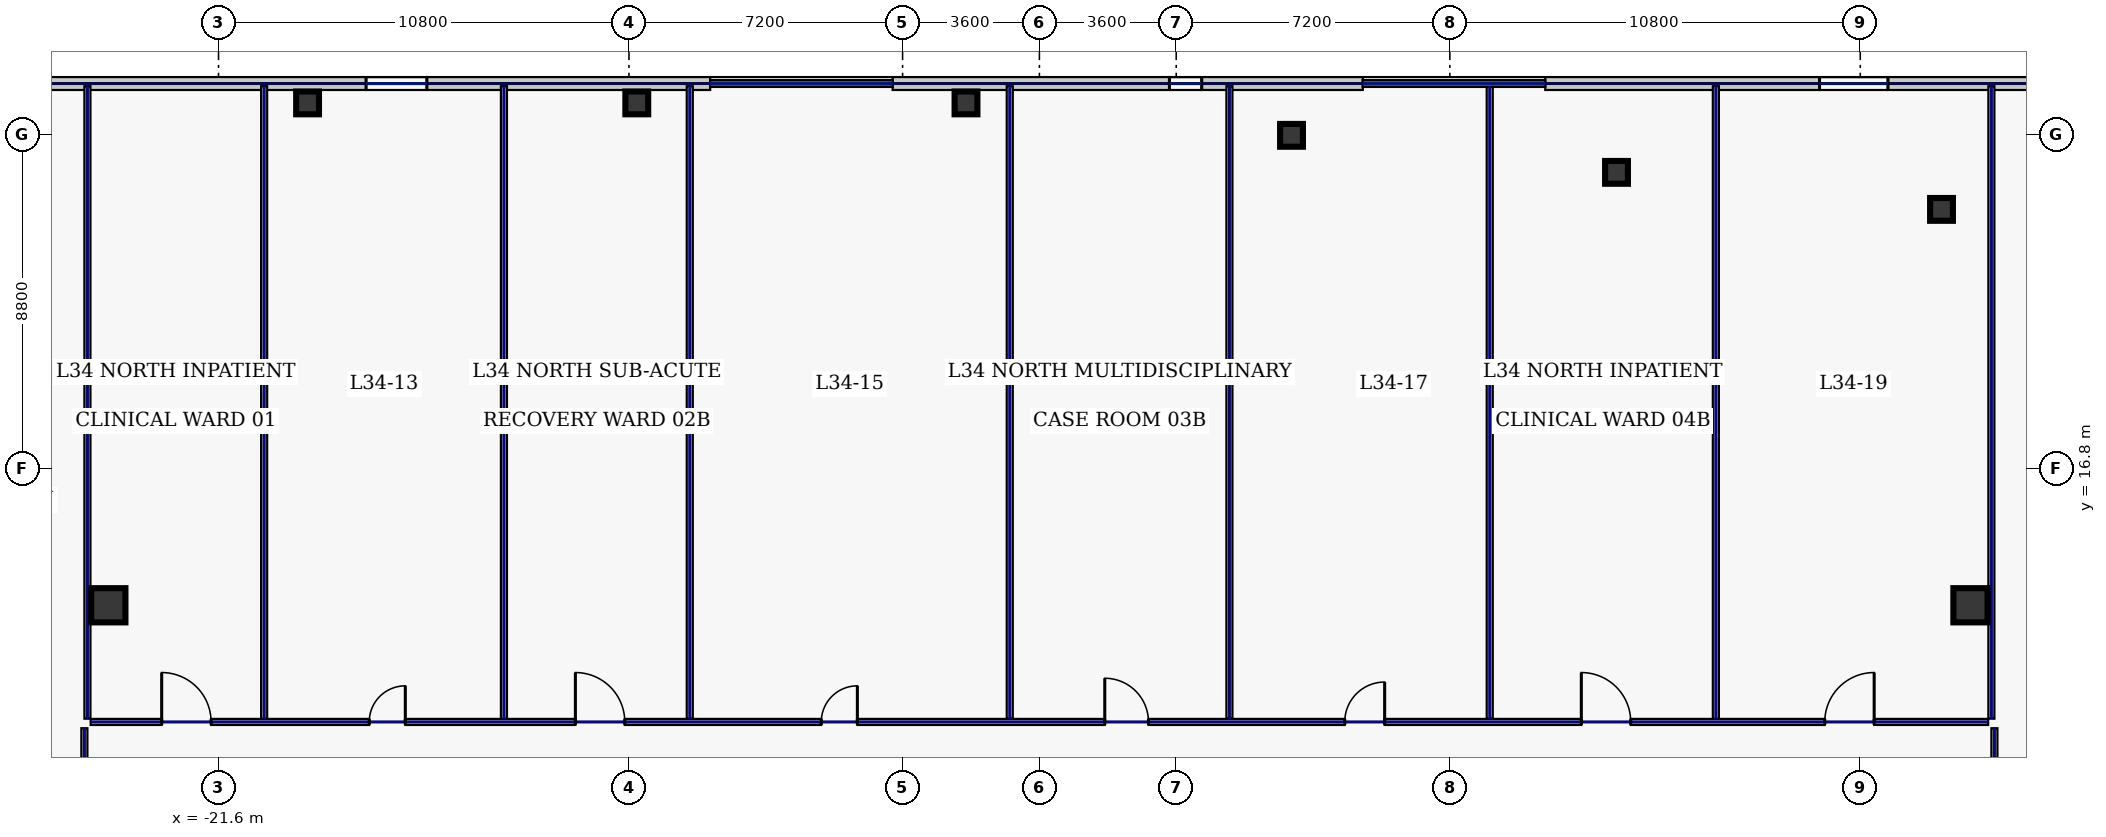
"""IFC4 building model, lengths in metres.
Left out: names, types, materials, properties, quantities, classifications, styles, units other than length and angle.
Written with IfcOpenShell. Run it as: python <this file> out.ifc"""

import sys

from ifc_helpers import new_model, si_unit, direction, frame, frame_2d, origin, origin_2d, place, context, subcontext, project, spatial, rectangle, hollow_rectangle, extrude, element, fill, save


model = new_model("IFC4")
c1 = context("Model", 3, precision=1e-05, world=origin(), true_north=direction((0.0, 1.0)))
c2 = subcontext(c1, "Body", "Model", "MODEL_VIEW")
j1 = project(units=[si_unit("LENGTHUNIT", "METRE"), si_unit("PLANEANGLEUNIT", "RADIAN")], contexts=[c1])
p1 = place(None, origin())
s1 = spatial("IfcSite", under=j1, at=p1, CompositionType="ELEMENT")
p2 = place(p1, origin())
s2 = spatial("IfcBuilding", under=s1, at=p2, CompositionType="ELEMENT")
p3 = place(p2, frame((0.0, 0.0, 152.2)))
s3 = spatial("IfcBuildingStorey", under=s2, at=p3, CompositionType="ELEMENT", Elevation=152.2)
for number, where, z_axis, x_axis in (
    (1, (-24.5, 13.2, 0.0), (0.0, 0.0, 1.0), (1.0, 0.0, 0.0)),
    (2, (24.5, 13.2, 0.0), (0.0, 0.0, 1.0), (1.0, 0.0, 0.0)),
):
    element("IfcColumn", number, at=place(p3, frame(where, z_axis=z_axis, x_axis=x_axis)), inside=s3, PredefinedType="COLUMN", context=c2, shape_type="SweptSolid", body=[
        extrude(hollow_rectangle(XDim=0.9, YDim=0.9, WallThickness=0.04, at=origin_2d()), origin(), (0.0, 0.0, 1.0), 3.74),
    ])
for number, where, z_axis, x_axis in (
    (3, (23.738, 23.618, 0.0), (0.0, 0.0, 1.0), (1.0, 0.0, 0.0)),
    (4, (15.186, 24.592, 0.0), (0.0, 0.0, 1.0), (1.0, 0.0, 0.0)),
    (5, (6.634, 25.567, 0.0), (0.0, 0.0, 1.0), (1.0, 0.0, 0.0)),
    (6, (-1.931, 26.42, 0.0), (0.0, 0.0, 1.0), (1.0, 0.0, 0.0)),
    (7, (-10.594, 26.42, 0.0), (0.0, 0.0, 1.0), (1.0, 0.0, 0.0)),
    (8, (-19.257, 26.42, 0.0), (0.0, 0.0, 1.0), (1.0, 0.0, 0.0)),
):
    element("IfcColumn", number, at=place(p3, frame(where, z_axis=z_axis, x_axis=x_axis)), inside=s3, PredefinedType="COLUMN", context=c2, shape_type="SweptSolid", body=[
        extrude(hollow_rectangle(XDim=0.6, YDim=0.6, WallThickness=0.028, at=origin_2d()), origin(), (0.0, 0.0, 1.0), 3.74),
    ])
p4 = place(p3, frame((33.4, 26.93, 0.0), z_axis=(0.0, 0.0, 1.0), x_axis=(-1.0, 0.0, 0.0)))
e9 = element("IfcWall", 9, at=p4, inside=s3, PredefinedType="STANDARD", context=c2, shape_type="SweptSolid", body=[
    extrude(rectangle(XDim=20.09, YDim=0.34, at=frame_2d((10.045, 0.0))), origin(), (0.0, 0.0, 1.0), 3.74),
])
p5 = place(p4, frame((11.071, 0.0, 0.7)))
e10 = element("IfcOpeningElement", 10, at=p5, cuts=e9, PredefinedType="OPENING", context=c2, shape_type="SweptSolid", body=[
    extrude(rectangle(XDim=1.8, YDim=2.2, at=frame_2d((0.9, 1.1))), frame((0.0, 0.18, 0.0), z_axis=(0.0, -1.0, 0.0), x_axis=(1.0, 0.0, 0.0)), (0.0, 0.0, 1.0), 0.36),
])
p6 = place(p4, frame((6.48, 0.0, 0.7)))
e11 = element("IfcOpeningElement", 11, at=p6, cuts=e9, PredefinedType="OPENING", context=c2, shape_type="SweptSolid", body=[
    extrude(rectangle(XDim=0.85, YDim=1.85, at=frame_2d((0.425, 0.925))), frame((0.0, 0.18, 0.0), z_axis=(0.0, -1.0, 0.0), x_axis=(1.0, 0.0, 0.0)), (0.0, 0.0, 1.0), 0.36),
])
p7 = place(p4, frame((2.591, 0.0, 0.7)))
e12 = element("IfcOpeningElement", 12, at=p7, cuts=e9, PredefinedType="OPENING", context=c2, shape_type="SweptSolid", body=[
    extrude(rectangle(XDim=1.8, YDim=2.2, at=frame_2d((0.9, 1.1))), frame((0.0, 0.18, 0.0), z_axis=(0.0, -1.0, 0.0), x_axis=(1.0, 0.0, 0.0)), (0.0, 0.0, 1.0), 0.36),
])
p8 = place(p3, frame((8.51, 26.93, 0.0), z_axis=(0.0, 0.0, 1.0), x_axis=(-1.0, 0.0, 0.0)))
e13 = element("IfcWall", 13, at=p8, inside=s3, PredefinedType="STANDARD", context=c2, shape_type="SweptSolid", body=[
    extrude(rectangle(XDim=12.373, YDim=0.34, at=frame_2d((6.187, 0.0))), origin(), (0.0, 0.0, 1.0), 3.74),
])
p9 = place(p8, frame((4.239, 0.0, 0.7)))
e14 = element("IfcOpeningElement", 14, at=p9, cuts=e13, PredefinedType="OPENING", context=c2, shape_type="SweptSolid", body=[
    extrude(rectangle(XDim=0.85, YDim=1.85, at=frame_2d((0.425, 0.925))), frame((0.0, 0.18, 0.0), z_axis=(0.0, -1.0, 0.0), x_axis=(1.0, 0.0, 0.0)), (0.0, 0.0, 1.0), 0.36),
])
p10 = place(p3, frame((-8.663, 26.93, 0.0), z_axis=(0.0, 0.0, 1.0), x_axis=(-1.0, 0.0, 0.0)))
e15 = element("IfcWall", 15, at=p10, inside=s3, PredefinedType="STANDARD", context=c2, shape_type="SweptSolid", body=[
    extrude(rectangle(XDim=19.937, YDim=0.34, at=frame_2d((9.969, 0.0))), origin(), (0.0, 0.0, 1.0), 3.74),
])
p11 = place(p10, frame((7.455, 0.0, 0.22)))
e16 = element("IfcOpeningElement", 16, at=p11, cuts=e15, PredefinedType="OPENING", context=c2, shape_type="SweptSolid", body=[
    extrude(rectangle(XDim=1.6, YDim=1.2, at=frame_2d((0.8, 0.6))), frame((0.0, 0.18, 0.0), z_axis=(0.0, -1.0, 0.0), x_axis=(1.0, 0.0, 0.0)), (0.0, 0.0, 1.0), 0.36),
])
p12 = place(p3, frame((-25.13, 6.985, 0.0), z_axis=(0.0, 0.0, 1.0), x_axis=(0.0, 1.0, 0.0)))
e17 = element("IfcWall", 17, at=p12, inside=s3, PredefinedType="PARTITIONING", context=c2, shape_type="SweptSolid", body=[
    extrude(rectangle(XDim=2.98, YDim=0.16, at=frame_2d((1.49, 0.0))), origin(), (0.0, 0.0, 1.0), 3.74),
])
p13 = place(p12, frame((1.1, 0.0, 0.0)))
e18 = element("IfcOpeningElement", 18, at=p13, cuts=e17, PredefinedType="OPENING", context=c2, shape_type="SweptSolid", body=[
    extrude(rectangle(XDim=0.95, YDim=2.2, at=frame_2d((0.475, 1.1))), frame((0.0, 0.09, 0.0), z_axis=(0.0, -1.0, 0.0), x_axis=(1.0, 0.0, 0.0)), (0.0, 0.0, 1.0), 0.18),
])
p14 = place(p3, frame((-24.965, 10.13, 0.0), z_axis=(0.0, 0.0, 1.0), x_axis=(1.0, 0.0, 0.0)))
e19 = element("IfcWall", 19, at=p14, inside=s3, PredefinedType="PARTITIONING", context=c2, shape_type="SweptSolid", body=[
    extrude(rectangle(XDim=49.93, YDim=0.16, at=frame_2d((24.965, 0.0))), origin(), (0.0, 0.0, 1.0), 3.74),
])
p15 = place(p14, frame((1.869, 0.0, 0.0)))
e20 = element("IfcOpeningElement", 20, at=p15, cuts=e19, PredefinedType="OPENING", context=c2, shape_type="SweptSolid", body=[
    extrude(rectangle(XDim=1.3, YDim=2.2, at=frame_2d((0.65, 1.1))), frame((0.0, 0.09, 0.0), z_axis=(0.0, -1.0, 0.0), x_axis=(1.0, 0.0, 0.0)), (0.0, 0.0, 1.0), 0.18),
])
p16 = place(p14, frame((7.33, 0.0, 0.0)))
e21 = element("IfcOpeningElement", 21, at=p16, cuts=e19, PredefinedType="OPENING", context=c2, shape_type="SweptSolid", body=[
    extrude(rectangle(XDim=0.95, YDim=2.2, at=frame_2d((0.475, 1.1))), frame((0.0, 0.09, 0.0), z_axis=(0.0, -1.0, 0.0), x_axis=(1.0, 0.0, 0.0)), (0.0, 0.0, 1.0), 0.18),
])
p17 = place(p14, frame((12.755, 0.0, 0.0)))
e22 = element("IfcOpeningElement", 22, at=p17, cuts=e19, PredefinedType="OPENING", context=c2, shape_type="SweptSolid", body=[
    extrude(rectangle(XDim=1.3, YDim=2.2, at=frame_2d((0.65, 1.1))), frame((0.0, 0.09, 0.0), z_axis=(0.0, -1.0, 0.0), x_axis=(1.0, 0.0, 0.0)), (0.0, 0.0, 1.0), 0.18),
])
p18 = place(p14, frame((19.225, 0.0, 0.0)))
e23 = element("IfcOpeningElement", 23, at=p18, cuts=e19, PredefinedType="OPENING", context=c2, shape_type="SweptSolid", body=[
    extrude(rectangle(XDim=0.95, YDim=2.2, at=frame_2d((0.475, 1.1))), frame((0.0, 0.09, 0.0), z_axis=(0.0, -1.0, 0.0), x_axis=(1.0, 0.0, 0.0)), (0.0, 0.0, 1.0), 0.18),
])
p19 = place(p14, frame((26.685, 0.0, 0.0)))
e24 = element("IfcOpeningElement", 24, at=p19, cuts=e19, PredefinedType="OPENING", context=c2, shape_type="SweptSolid", body=[
    extrude(rectangle(XDim=1.15, YDim=2.2, at=frame_2d((0.575, 1.1))), frame((0.0, 0.09, 0.0), z_axis=(0.0, -1.0, 0.0), x_axis=(1.0, 0.0, 0.0)), (0.0, 0.0, 1.0), 0.18),
])
p20 = place(p14, frame((33.0, 0.0, 0.0)))
e25 = element("IfcOpeningElement", 25, at=p20, cuts=e19, PredefinedType="OPENING", context=c2, shape_type="SweptSolid", body=[
    extrude(rectangle(XDim=1.05, YDim=2.2, at=frame_2d((0.525, 1.1))), frame((0.0, 0.09, 0.0), z_axis=(0.0, -1.0, 0.0), x_axis=(1.0, 0.0, 0.0)), (0.0, 0.0, 1.0), 0.18),
])
p21 = place(p14, frame((39.225, 0.0, 0.0)))
e26 = element("IfcOpeningElement", 26, at=p21, cuts=e19, PredefinedType="OPENING", context=c2, shape_type="SweptSolid", body=[
    extrude(rectangle(XDim=1.3, YDim=2.2, at=frame_2d((0.65, 1.1))), frame((0.0, 0.09, 0.0), z_axis=(0.0, -1.0, 0.0), x_axis=(1.0, 0.0, 0.0)), (0.0, 0.0, 1.0), 0.18),
])
p22 = place(p14, frame((45.631, 0.0, 0.0)))
e27 = element("IfcOpeningElement", 27, at=p22, cuts=e19, PredefinedType="OPENING", context=c2, shape_type="SweptSolid", body=[
    extrude(rectangle(XDim=1.3, YDim=2.2, at=frame_2d((0.65, 1.1))), frame((0.0, 0.09, 0.0), z_axis=(0.0, -1.0, 0.0), x_axis=(1.0, 0.0, 0.0)), (0.0, 0.0, 1.0), 0.18),
])
p23 = place(p3, frame((25.13, 9.965, 0.0), z_axis=(0.0, 0.0, 1.0), x_axis=(0.0, -1.0, 0.0)))
e28 = element("IfcWall", 28, at=p23, inside=s3, PredefinedType="PARTITIONING", context=c2, shape_type="SweptSolid", body=[
    extrude(rectangle(XDim=2.98, YDim=0.16, at=frame_2d((1.49, 0.0))), origin(), (0.0, 0.0, 1.0), 3.74),
])
p24 = place(p23, frame((1.1, 0.0, 0.0)))
e29 = element("IfcOpeningElement", 29, at=p24, cuts=e28, PredefinedType="OPENING", context=c2, shape_type="SweptSolid", body=[
    extrude(rectangle(XDim=0.95, YDim=2.2, at=frame_2d((0.475, 1.1))), frame((0.0, 0.09, 0.0), z_axis=(0.0, -1.0, 0.0), x_axis=(1.0, 0.0, 0.0)), (0.0, 0.0, 1.0), 0.18),
])
p25 = place(p3, frame((-25.05, 10.215, 0.0), z_axis=(0.0, 0.0, 1.0), x_axis=(0.0, 1.0, 0.0)))
e30 = element("IfcWall", 30, at=p25, inside=s3, PredefinedType="PARTITIONING", context=c2, shape_type="SweptSolid", body=[
    extrude(rectangle(XDim=16.645, YDim=0.16, at=frame_2d((8.323, 0.0))), origin(), (0.0, 0.0, 1.0), 2.135),
])
for number, where, z_axis, x_axis in (
    (31, (25.05, 10.215, 0.0), (0.0, 0.0, 1.0), (0.0, 1.0, 0.0)),
    (32, (-20.4, 10.215, 0.0), (0.0, 0.0, 1.0), (0.0, 1.0, 0.0)),
    (33, (-9.2, 10.215, 0.0), (0.0, 0.0, 1.0), (0.0, 1.0, 0.0)),
):
    element("IfcWall", number, at=place(p3, frame(where, z_axis=z_axis, x_axis=x_axis)), inside=s3, PredefinedType="PARTITIONING", context=c2, shape_type="SweptSolid", body=[
        extrude(rectangle(XDim=16.645, YDim=0.16, at=frame_2d((8.323, 0.0))), origin(), (0.0, 0.0, 1.0), 3.74),
    ])
p26 = place(p3, frame((5.0, 10.215, 0.0), z_axis=(0.0, 0.0, 1.0), x_axis=(0.0, 1.0, 0.0)))
e34 = element("IfcWall", 34, at=p26, inside=s3, PredefinedType="PARTITIONING", context=c2, shape_type="SweptSolid", body=[
    extrude(rectangle(XDim=16.645, YDim=0.16, at=frame_2d((8.323, 0.0))), origin(), (0.0, 0.0, 1.0), 1.535),
])
for number, where, z_axis, x_axis in (
    (35, (17.8, 10.215, 0.0), (0.0, 0.0, 1.0), (0.0, 1.0, 0.0)),
    (36, (-14.09, 10.215, 0.0), (0.0, 0.0, 1.0), (0.0, 1.0, 0.0)),
    (37, (-0.78, 10.215, 0.0), (0.0, 0.0, 1.0), (0.0, 1.0, 0.0)),
    (38, (11.85, 10.215, 0.0), (0.0, 0.0, 1.0), (0.0, 1.0, 0.0)),
):
    element("IfcWall", number, at=place(p3, frame(where, z_axis=z_axis, x_axis=x_axis)), inside=s3, PredefinedType="PARTITIONING", context=c2, shape_type="SweptSolid", body=[
        extrude(rectangle(XDim=16.645, YDim=0.16, at=frame_2d((8.323, 0.0))), origin(), (0.0, 0.0, 1.0), 3.74),
    ])
p27 = place(p5, origin())
e39 = element("IfcWindow", 39, at=p27, inside=s3, PartitioningType="SINGLE_PANEL", PredefinedType="WINDOW", context=c2, shape_type="SweptSolid", body=[
    extrude(rectangle(XDim=1.8, YDim=2.2, at=frame_2d((0.9, 1.1))), frame((0.0, 0.03, 0.0), z_axis=(0.0, -1.0, 0.0), x_axis=(1.0, 0.0, 0.0)), (0.0, 0.0, 1.0), 0.06),
])
fill(e10, e39)
p28 = place(p9, origin())
e40 = element("IfcWindow", 40, at=p28, inside=s3, PartitioningType="SINGLE_PANEL", PredefinedType="WINDOW", context=c2, shape_type="SweptSolid", body=[
    extrude(rectangle(XDim=0.85, YDim=1.85, at=frame_2d((0.425, 0.925))), frame((0.0, 0.03, 0.0), z_axis=(0.0, -1.0, 0.0), x_axis=(1.0, 0.0, 0.0)), (0.0, 0.0, 1.0), 0.06),
])
fill(e14, e40)
p29 = place(p11, origin())
e41 = element("IfcWindow", 41, at=p29, inside=s3, PartitioningType="SINGLE_PANEL", PredefinedType="WINDOW", context=c2, shape_type="SweptSolid", body=[
    extrude(rectangle(XDim=1.6, YDim=1.2, at=frame_2d((0.8, 0.6))), frame((0.0, 0.03, 0.0), z_axis=(0.0, -1.0, 0.0), x_axis=(1.0, 0.0, 0.0)), (0.0, 0.0, 1.0), 0.06),
])
fill(e16, e41)
p30 = place(p15, origin())
e42 = element("IfcDoor", 42, at=p30, inside=s3, OperationType="SINGLE_SWING_LEFT", PredefinedType="DOOR", context=c2, shape_type="SweptSolid", body=[
    extrude(rectangle(XDim=1.3, YDim=2.2, at=frame_2d((0.65, 1.1))), frame((0.0, 0.025, 0.0), z_axis=(0.0, -1.0, 0.0), x_axis=(1.0, 0.0, 0.0)), (0.0, 0.0, 1.0), 0.05),
])
fill(e20, e42)
p31 = place(p16, origin())
e43 = element("IfcDoor", 43, at=p31, inside=s3, OperationType="SINGLE_SWING_RIGHT", PredefinedType="DOOR", context=c2, shape_type="SweptSolid", body=[
    extrude(rectangle(XDim=0.95, YDim=2.2, at=frame_2d((0.475, 1.1))), frame((0.0, 0.025, 0.0), z_axis=(0.0, -1.0, 0.0), x_axis=(1.0, 0.0, 0.0)), (0.0, 0.0, 1.0), 0.05),
])
fill(e21, e43)
p32 = place(p17, origin())
e44 = element("IfcDoor", 44, at=p32, inside=s3, OperationType="SINGLE_SWING_LEFT", PredefinedType="DOOR", context=c2, shape_type="SweptSolid", body=[
    extrude(rectangle(XDim=1.3, YDim=2.2, at=frame_2d((0.65, 1.1))), frame((0.0, 0.025, 0.0), z_axis=(0.0, -1.0, 0.0), x_axis=(1.0, 0.0, 0.0)), (0.0, 0.0, 1.0), 0.05),
])
fill(e22, e44)
p33 = place(p18, origin())
e45 = element("IfcDoor", 45, at=p33, inside=s3, OperationType="SINGLE_SWING_RIGHT", PredefinedType="DOOR", context=c2, shape_type="SweptSolid", body=[
    extrude(rectangle(XDim=0.95, YDim=2.2, at=frame_2d((0.475, 1.1))), frame((0.0, 0.025, 0.0), z_axis=(0.0, -1.0, 0.0), x_axis=(1.0, 0.0, 0.0)), (0.0, 0.0, 1.0), 0.05),
])
fill(e23, e45)
p34 = place(p19, origin())
e46 = element("IfcDoor", 46, at=p34, inside=s3, OperationType="SINGLE_SWING_LEFT", PredefinedType="DOOR", context=c2, shape_type="SweptSolid", body=[
    extrude(rectangle(XDim=1.15, YDim=2.2, at=frame_2d((0.575, 1.1))), frame((0.0, 0.025, 0.0), z_axis=(0.0, -1.0, 0.0), x_axis=(1.0, 0.0, 0.0)), (0.0, 0.0, 1.0), 0.05),
])
fill(e24, e46)
p35 = place(p20, origin())
e47 = element("IfcDoor", 47, at=p35, inside=s3, OperationType="SINGLE_SWING_RIGHT", PredefinedType="DOOR", context=c2, shape_type="SweptSolid", body=[
    extrude(rectangle(XDim=1.05, YDim=2.2, at=frame_2d((0.525, 1.1))), frame((0.0, 0.025, 0.0), z_axis=(0.0, -1.0, 0.0), x_axis=(1.0, 0.0, 0.0)), (0.0, 0.0, 1.0), 0.05),
])
fill(e25, e47)
p36 = place(p21, origin())
e48 = element("IfcDoor", 48, at=p36, inside=s3, OperationType="SINGLE_SWING_LEFT", PredefinedType="DOOR", context=c2, shape_type="SweptSolid", body=[
    extrude(rectangle(XDim=1.3, YDim=2.2, at=frame_2d((0.65, 1.1))), frame((0.0, 0.025, 0.0), z_axis=(0.0, -1.0, 0.0), x_axis=(1.0, 0.0, 0.0)), (0.0, 0.0, 1.0), 0.05),
])
fill(e26, e48)
p37 = place(p22, origin())
e49 = element("IfcDoor", 49, at=p37, inside=s3, OperationType="SINGLE_SWING_RIGHT", PredefinedType="DOOR", context=c2, shape_type="SweptSolid", body=[
    extrude(rectangle(XDim=1.3, YDim=2.2, at=frame_2d((0.65, 1.1))), frame((0.0, 0.025, 0.0), z_axis=(0.0, -1.0, 0.0), x_axis=(1.0, 0.0, 0.0)), (0.0, 0.0, 1.0), 0.05),
])
fill(e27, e49)
save(model, sys.argv[1])
